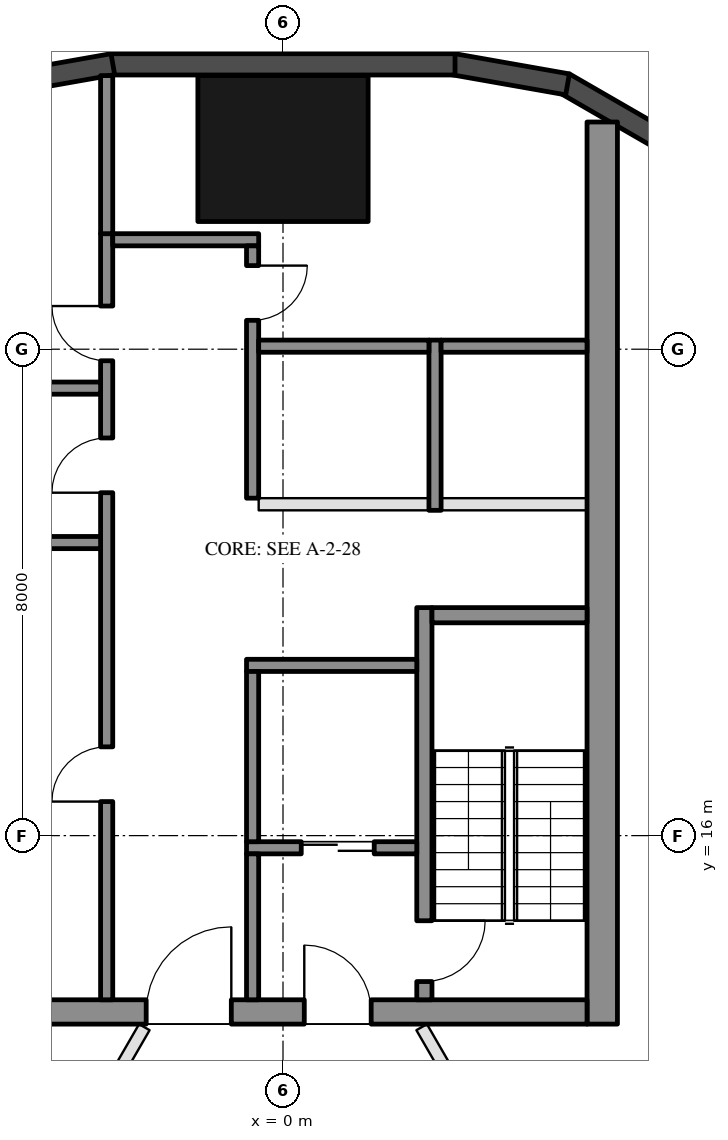
"""IFC4 building model, lengths in metres.
Left out: names, types, materials, properties, quantities, classifications, styles, units other than length and angle.
Written with IfcOpenShell. Run it as: python <this file> out.ifc"""

import sys

from ifc_helpers import new_model, si_unit, direction, frame, frame_2d, origin, origin_2d, place, context, subcontext, project, spatial, rectangle, hollow_rectangle, extrude, element, fill, save


model = new_model("IFC4")
c1 = context("Model", 3, precision=1e-05, world=origin(), true_north=direction((0.0, 1.0)))
c2 = subcontext(c1, "Body", "Model", "MODEL_VIEW")
j1 = project(units=[si_unit("LENGTHUNIT", "METRE"), si_unit("PLANEANGLEUNIT", "RADIAN")], contexts=[c1])
p1 = place(None, origin())
s1 = spatial("IfcSite", under=j1, at=p1, CompositionType="ELEMENT")
p2 = place(p1, origin())
s2 = spatial("IfcBuilding", under=s1, at=p2, CompositionType="ELEMENT")
p3 = place(p2, frame((0.0, 0.0, 124.2)))
s3 = spatial("IfcBuildingStorey", under=s2, at=p3, CompositionType="ELEMENT", Elevation=124.2)
p4 = place(p3, frame((0.0, 27.3, 0.0), z_axis=(0.0, 0.0, 1.0), x_axis=(1.0, 0.0, 0.0)))
e1 = element("IfcColumn", 1, at=p4, inside=s3, PredefinedType="COLUMN", context=c2, shape_type="SweptSolid", body=[
    extrude(hollow_rectangle(XDim=2.8, YDim=2.4, WallThickness=0.07, at=origin_2d()), origin(), (0.0, 0.0, 1.0), 3.7),
])
for number, where, z_axis, x_axis in (
    (2, (6.277, 27.422, 0.0), (0.0, 0.0, 1.0), (-0.866, 0.5, 0.0)),
    (3, (4.68, 28.356, 0.0), (0.0, 0.0, 1.0), (-0.985, 0.174, 0.0)),
):
    element("IfcWall", number, at=place(p3, frame(where, z_axis=z_axis, x_axis=x_axis)), inside=s3, PredefinedType="SOLIDWALL", context=c2, shape_type="SweptSolid", body=[
        extrude(rectangle(XDim=1.91, YDim=0.35, at=frame_2d((0.955, 0.0))), origin(), (0.0, 0.0, 1.0), 3.55),
    ])
p5 = place(p3, frame((2.829, 28.685, 0.0), z_axis=(0.0, 0.0, 1.0), x_axis=(-1.0, 0.0, 0.0)))
e4 = element("IfcWall", 4, at=p5, inside=s3, PredefinedType="SOLIDWALL", context=c2, shape_type="SweptSolid", body=[
    extrude(rectangle(XDim=5.658, YDim=0.35, at=frame_2d((2.829, 0.0))), origin(), (0.0, 0.0, 1.0), 3.55),
])
p6 = place(p3, frame((-2.799, 28.688, 0.0), z_axis=(0.0, 0.0, 1.0), x_axis=(-0.984798995425, -0.173697837091, 0.0)))
e5 = element("IfcWall", 5, at=p6, inside=s3, PredefinedType="SOLIDWALL", context=c2, shape_type="SweptSolid", body=[
    extrude(rectangle(XDim=1.91, YDim=0.35, at=frame_2d((0.955, 0.0))), origin(), (0.0, 0.0, 1.0), 3.55),
])
p7 = place(p3, frame((5.25, 12.9, 0.0), z_axis=(0.0, 0.0, 1.0), x_axis=(0.0, 1.0, 0.0)))
e6 = element("IfcWall", 6, at=p7, inside=s3, PredefinedType="SHEAR", context=c2, shape_type="SweptSolid", body=[
    extrude(rectangle(XDim=14.837, YDim=0.5, at=frame_2d((7.418, 0.0))), origin(), (0.0, 0.0, 1.0), 3.5),
])
p8 = place(p3, frame((5.0, 13.1, 0.0), z_axis=(0.0, 0.0, 1.0), x_axis=(-1.0, 0.0, 0.0)))
e7 = element("IfcWall", 7, at=p8, inside=s3, PredefinedType="SHEAR", context=c2, shape_type="SweptSolid", body=[
    extrude(rectangle(XDim=10.0, YDim=0.4, at=frame_2d((5.0, 0.0))), origin(), (0.0, 0.0, 1.0), 3.5),
])
p9 = place(p8, frame((3.55, 0.0, 0.0)))
e8 = element("IfcOpeningElement", 8, at=p9, cuts=e7, PredefinedType="OPENING", context=c2, shape_type="SweptSolid", body=[
    extrude(rectangle(XDim=1.1, YDim=2.1, at=frame_2d((0.55, 1.05))), frame((0.0, 0.21, 0.0), z_axis=(0.0, -1.0, 0.0), x_axis=(1.0, 0.0, 0.0)), (0.0, 0.0, 1.0), 0.42),
])
p10 = place(p8, frame((5.85, 0.0, 0.0)))
e9 = element("IfcOpeningElement", 9, at=p10, cuts=e7, PredefinedType="OPENING", context=c2, shape_type="SweptSolid", body=[
    extrude(rectangle(XDim=1.4, YDim=2.1, at=frame_2d((0.7, 1.05))), frame((0.0, 0.21, 0.0), z_axis=(0.0, -1.0, 0.0), x_axis=(1.0, 0.0, 0.0)), (0.0, 0.0, 1.0), 0.42),
])
p11 = place(p3, frame((2.325, 13.3, 0.0), z_axis=(0.0, 0.0, 1.0), x_axis=(0.0, 1.0, 0.0)))
e10 = element("IfcWall", 10, at=p11, inside=s3, PredefinedType="SHEAR", context=c2, shape_type="SweptSolid", body=[
    extrude(rectangle(XDim=6.45, YDim=0.25, at=frame_2d((3.225, 0.0))), origin(), (0.0, 0.0, 1.0), 3.5),
])
p12 = place(p11, frame((0.3, 0.0, 0.0)))
e11 = element("IfcOpeningElement", 11, at=p12, cuts=e10, PredefinedType="OPENING", context=c2, shape_type="SweptSolid", body=[
    extrude(rectangle(XDim=1.0, YDim=2.1, at=frame_2d((0.5, 1.05))), frame((0.0, 0.135, 0.0), z_axis=(0.0, -1.0, 0.0), x_axis=(1.0, 0.0, 0.0)), (0.0, 0.0, 1.0), 0.27),
])
p13 = place(p3, frame((5.0, 19.625, 0.0), z_axis=(0.0, 0.0, 1.0), x_axis=(-1.0, 0.0, 0.0)))
e12 = element("IfcWall", 12, at=p13, inside=s3, PredefinedType="SHEAR", context=c2, shape_type="SweptSolid", body=[
    extrude(rectangle(XDim=2.55, YDim=0.25, at=frame_2d((1.275, 0.0))), origin(), (0.0, 0.0, 1.0), 3.5),
])
p14 = place(p3, frame((2.2, 18.8, 0.0), z_axis=(0.0, 0.0, 1.0), x_axis=(-1.0, 0.0, 0.0)))
e13 = element("IfcWall", 13, at=p14, inside=s3, PredefinedType="SHEAR", context=c2, shape_type="SweptSolid", body=[
    extrude(rectangle(XDim=2.8, YDim=0.2, at=frame_2d((1.4, 0.0))), origin(), (0.0, 0.0, 1.0), 3.5),
])
p15 = place(p3, frame((2.2, 15.8, 0.0), z_axis=(0.0, 0.0, 1.0), x_axis=(-1.0, 0.0, 0.0)))
e14 = element("IfcWall", 14, at=p15, inside=s3, PredefinedType="SHEAR", context=c2, shape_type="SweptSolid", body=[
    extrude(rectangle(XDim=2.8, YDim=0.2, at=frame_2d((1.4, 0.0))), origin(), (0.0, 0.0, 1.0), 3.5),
])
p16 = place(p15, frame((0.7, 0.0, 0.0)))
e15 = element("IfcOpeningElement", 15, at=p16, cuts=e14, PredefinedType="OPENING", context=c2, shape_type="SweptSolid", body=[
    extrude(rectangle(XDim=1.2, YDim=2.1, at=frame_2d((0.6, 1.05))), frame((0.0, 0.11, 0.0), z_axis=(0.0, -1.0, 0.0), x_axis=(1.0, 0.0, 0.0)), (0.0, 0.0, 1.0), 0.22),
])
p17 = place(p3, frame((-0.5, 15.9, 0.0), z_axis=(0.0, 0.0, 1.0), x_axis=(0.0, 1.0, 0.0)))
e16 = element("IfcWall", 16, at=p17, inside=s3, PredefinedType="SHEAR", context=c2, shape_type="SweptSolid", body=[
    extrude(rectangle(XDim=2.8, YDim=0.2, at=frame_2d((1.4, 0.0))), origin(), (0.0, 0.0, 1.0), 3.5),
])
p18 = place(p3, frame((-0.5, 13.3, 0.0), z_axis=(0.0, 0.0, 1.0), x_axis=(0.0, 1.0, 0.0)))
e17 = element("IfcWall", 17, at=p18, inside=s3, PredefinedType="SHEAR", context=c2, shape_type="SweptSolid", body=[
    extrude(rectangle(XDim=2.4, YDim=0.2, at=frame_2d((1.2, 0.0))), origin(), (0.0, 0.0, 1.0), 3.5),
])
p19 = place(p3, frame((-2.9, 13.3, 0.0), z_axis=(0.0, 0.0, 1.0), x_axis=(0.0, 1.0, 0.0)))
e18 = element("IfcWall", 18, at=p19, inside=s3, PredefinedType="SHEAR", context=c2, shape_type="SweptSolid", body=[
    extrude(rectangle(XDim=12.6, YDim=0.2, at=frame_2d((6.3, 0.0))), origin(), (0.0, 0.0, 1.0), 3.5),
])
p20 = place(p19, frame((3.26, 0.0, 0.0)))
e19 = element("IfcOpeningElement", 19, at=p20, cuts=e18, PredefinedType="OPENING", context=c2, shape_type="SweptSolid", body=[
    extrude(rectangle(XDim=0.9, YDim=2.1, at=frame_2d((0.45, 1.05))), frame((0.0, 0.11, 0.0), z_axis=(0.0, -1.0, 0.0), x_axis=(1.0, 0.0, 0.0)), (0.0, 0.0, 1.0), 0.22),
])
p21 = place(p19, frame((8.34, 0.0, 0.0)))
e20 = element("IfcOpeningElement", 20, at=p21, cuts=e18, PredefinedType="OPENING", context=c2, shape_type="SweptSolid", body=[
    extrude(rectangle(XDim=0.9, YDim=2.1, at=frame_2d((0.45, 1.05))), frame((0.0, 0.11, 0.0), z_axis=(0.0, -1.0, 0.0), x_axis=(1.0, 0.0, 0.0)), (0.0, 0.0, 1.0), 0.22),
])
p22 = place(p19, frame((10.51, 0.0, 0.0)))
e21 = element("IfcOpeningElement", 21, at=p22, cuts=e18, PredefinedType="OPENING", context=c2, shape_type="SweptSolid", body=[
    extrude(rectangle(XDim=0.9, YDim=2.1, at=frame_2d((0.45, 1.05))), frame((0.0, 0.11, 0.0), z_axis=(0.0, -1.0, 0.0), x_axis=(1.0, 0.0, 0.0)), (0.0, 0.0, 1.0), 0.22),
])
p23 = place(p3, frame((-0.4, 25.8, 0.0), z_axis=(0.0, 0.0, 1.0), x_axis=(-1.0, 0.0, 0.0)))
e22 = element("IfcWall", 22, at=p23, inside=s3, PredefinedType="SHEAR", context=c2, shape_type="SweptSolid", body=[
    extrude(rectangle(XDim=2.4, YDim=0.2, at=frame_2d((1.2, 0.0))), origin(), (0.0, 0.0, 1.0), 3.5),
])
p24 = place(p3, frame((-0.5, 21.55, 0.0), z_axis=(0.0, 0.0, 1.0), x_axis=(0.0, 1.0, 0.0)))
e23 = element("IfcWall", 23, at=p24, inside=s3, PredefinedType="SHEAR", context=c2, shape_type="SweptSolid", body=[
    extrude(rectangle(XDim=4.15, YDim=0.2, at=frame_2d((2.075, 0.0))), origin(), (0.0, 0.0, 1.0), 3.5),
])
p25 = place(p24, frame((2.925, 0.0, 0.0)))
e24 = element("IfcOpeningElement", 24, at=p25, cuts=e23, PredefinedType="OPENING", context=c2, shape_type="SweptSolid", body=[
    extrude(rectangle(XDim=0.9, YDim=2.1, at=frame_2d((0.45, 1.05))), frame((0.0, 0.11, 0.0), z_axis=(0.0, -1.0, 0.0), x_axis=(1.0, 0.0, 0.0)), (0.0, 0.0, 1.0), 0.22),
])
for number, where, z_axis, x_axis in (
    (25, (-3.0, 20.82, 0.0), (0.0, 0.0, 1.0), (-1.0, 0.0, 0.0)),
    (26, (-3.0, 23.36, 0.0), (0.0, 0.0, 1.0), (-1.0, 0.0, 0.0)),
):
    element("IfcWall", number, at=place(p3, frame(where, z_axis=z_axis, x_axis=x_axis)), inside=s3, PredefinedType="SHEAR", context=c2, shape_type="SweptSolid", body=[
        extrude(rectangle(XDim=2.0, YDim=0.2, at=frame_2d((1.0, 0.0))), origin(), (0.0, 0.0, 1.0), 3.5),
    ])
p26 = place(p3, frame((-2.9, 25.9, 0.0), z_axis=(0.0, 0.0, 1.0), x_axis=(0.0, 1.0, 0.0)))
e27 = element("IfcWall", 27, at=p26, inside=s3, PredefinedType="SHEAR", context=c2, shape_type="SweptSolid", body=[
    extrude(rectangle(XDim=2.6, YDim=0.2, at=frame_2d((1.3, 0.0))), origin(), (0.0, 0.0, 1.0), 3.5),
])
p27 = place(p3, frame((2.5, 21.35, 0.0), z_axis=(0.0, 0.0, 1.0), x_axis=(0.0, 1.0, 0.0)))
e28 = element("IfcWall", 28, at=p27, inside=s3, PredefinedType="SHEAR", context=c2, shape_type="SweptSolid", body=[
    extrude(rectangle(XDim=2.8, YDim=0.2, at=frame_2d((1.4, 0.0))), origin(), (0.0, 0.0, 1.0), 3.5),
])
p28 = place(p3, frame((5.0, 24.05, 0.0), z_axis=(0.0, 0.0, 1.0), x_axis=(-1.0, 0.0, 0.0)))
e29 = element("IfcWall", 29, at=p28, inside=s3, PredefinedType="SHEAR", context=c2, shape_type="SweptSolid", body=[
    extrude(rectangle(XDim=2.4, YDim=0.2, at=frame_2d((1.2, 0.0))), origin(), (0.0, 0.0, 1.0), 3.5),
])
p29 = place(p3, frame((2.4, 24.05, 0.0), z_axis=(0.0, 0.0, 1.0), x_axis=(-1.0, 0.0, 0.0)))
e30 = element("IfcWall", 30, at=p29, inside=s3, PredefinedType="SHEAR", context=c2, shape_type="SweptSolid", body=[
    extrude(rectangle(XDim=2.8, YDim=0.2, at=frame_2d((1.4, 0.0))), origin(), (0.0, 0.0, 1.0), 3.5),
])
p30 = place(p3, frame((5.0, 21.45, 0.0), z_axis=(0.0, 0.0, 1.0), x_axis=(-1.0, 0.0, 0.0)))
e31 = element("IfcWall", 31, at=p30, inside=s3, PredefinedType="PARTITIONING", context=c2, shape_type="SweptSolid", body=[
    extrude(rectangle(XDim=2.4, YDim=0.2, at=frame_2d((1.2, 0.0))), origin(), (0.0, 0.0, 1.0), 3.5),
])
p31 = place(p3, frame((2.4, 21.45, 0.0), z_axis=(0.0, 0.0, 1.0), x_axis=(-1.0, 0.0, 0.0)))
e32 = element("IfcWall", 32, at=p31, inside=s3, PredefinedType="PARTITIONING", context=c2, shape_type="SweptSolid", body=[
    extrude(rectangle(XDim=2.8, YDim=0.2, at=frame_2d((1.4, 0.0))), origin(), (0.0, 0.0, 1.0), 3.5),
])
p32 = place(p3, frame((2.281, 12.85, 0.0), z_axis=(0.0, 0.0, 1.0), x_axis=(0.499992362392, -0.866029813314, 0.0)))
e33 = element("IfcWall", 33, at=p32, inside=s3, PredefinedType="PARTITIONING", context=c2, shape_type="SweptSolid", body=[
    extrude(rectangle(XDim=7.986, YDim=0.2, at=frame_2d((3.993, 0.0))), origin(), (0.0, 0.0, 1.0), 2.95),
])
p33 = place(p32, frame((3.493, 0.0, 0.0)))
e34 = element("IfcOpeningElement", 34, at=p33, cuts=e33, PredefinedType="OPENING", context=c2, shape_type="SweptSolid", body=[
    extrude(rectangle(XDim=1.0, YDim=2.1, at=frame_2d((0.5, 1.05))), frame((0.0, 0.11, 0.0), z_axis=(0.0, -1.0, 0.0), x_axis=(1.0, 0.0, 0.0)), (0.0, 0.0, 1.0), 0.22),
])
p34 = place(p3, frame((-5.323, 7.581, 0.0), z_axis=(0.0, 0.0, 1.0), x_axis=(0.49998410452, 0.866034580849, 0.0)))
e35 = element("IfcWall", 35, at=p34, inside=s3, PredefinedType="PARTITIONING", context=c2, shape_type="SweptSolid", body=[
    extrude(rectangle(XDim=6.085, YDim=0.2, at=frame_2d((3.042, 0.0))), origin(), (0.0, 0.0, 1.0), 2.95),
])
p35 = place(p34, frame((2.542, 0.0, 0.0)))
e36 = element("IfcOpeningElement", 36, at=p35, cuts=e35, PredefinedType="OPENING", context=c2, shape_type="SweptSolid", body=[
    extrude(rectangle(XDim=1.0, YDim=2.1, at=frame_2d((0.5, 1.05))), frame((0.0, 0.11, 0.0), z_axis=(0.0, -1.0, 0.0), x_axis=(1.0, 0.0, 0.0)), (0.0, 0.0, 1.0), 0.22),
])
p36 = place(p16, origin())
e37 = element("IfcDoor", 37, at=p36, inside=s3, OperationType="DOUBLE_DOOR_SLIDING", PredefinedType="DOOR", context=c2, shape_type="SweptSolid", body=[
    extrude(rectangle(XDim=1.2, YDim=2.1, at=frame_2d((0.6, 1.05))), frame((0.0, 0.025, 0.0), z_axis=(0.0, -1.0, 0.0), x_axis=(1.0, 0.0, 0.0)), (0.0, 0.0, 1.0), 0.05),
])
fill(e15, e37)
p37 = place(p20, origin())
e38 = element("IfcDoor", 38, at=p37, inside=s3, OperationType="SINGLE_SWING_LEFT", PredefinedType="DOOR", context=c2, shape_type="SweptSolid", body=[
    extrude(rectangle(XDim=0.9, YDim=2.1, at=frame_2d((0.45, 1.05))), frame((0.0, 0.025, 0.0), z_axis=(0.0, -1.0, 0.0), x_axis=(1.0, 0.0, 0.0)), (0.0, 0.0, 1.0), 0.05),
])
fill(e19, e38)
p38 = place(p21, origin())
e39 = element("IfcDoor", 39, at=p38, inside=s3, OperationType="SINGLE_SWING_LEFT", PredefinedType="DOOR", context=c2, shape_type="SweptSolid", body=[
    extrude(rectangle(XDim=0.9, YDim=2.1, at=frame_2d((0.45, 1.05))), frame((0.0, 0.025, 0.0), z_axis=(0.0, -1.0, 0.0), x_axis=(1.0, 0.0, 0.0)), (0.0, 0.0, 1.0), 0.05),
])
fill(e20, e39)
p39 = place(p22, origin())
e40 = element("IfcDoor", 40, at=p39, inside=s3, OperationType="SINGLE_SWING_RIGHT", PredefinedType="DOOR", context=c2, shape_type="SweptSolid", body=[
    extrude(rectangle(XDim=0.9, YDim=2.1, at=frame_2d((0.45, 1.05))), frame((0.0, 0.025, 0.0), z_axis=(0.0, -1.0, 0.0), x_axis=(1.0, 0.0, 0.0)), (0.0, 0.0, 1.0), 0.05),
])
fill(e21, e40)
p40 = place(p25, frame((0.9, 0.0, 0.0), z_axis=(0.0, 0.0, 1.0), x_axis=(-1.0, 0.0, 0.0)))
e41 = element("IfcDoor", 41, at=p40, inside=s3, OperationType="SINGLE_SWING_LEFT", PredefinedType="DOOR", context=c2, shape_type="SweptSolid", body=[
    extrude(rectangle(XDim=0.9, YDim=2.1, at=frame_2d((0.45, 1.05))), frame((0.0, 0.025, 0.0), z_axis=(0.0, -1.0, 0.0), x_axis=(1.0, 0.0, 0.0)), (0.0, 0.0, 1.0), 0.05),
])
fill(e24, e41)
p41 = place(p9, frame((1.1, 0.0, 0.0), z_axis=(0.0, 0.0, 1.0), x_axis=(-1.0, 0.0, 0.0)))
e42 = element("IfcDoor", 42, at=p41, inside=s3, OperationType="SINGLE_SWING_LEFT", PredefinedType="DOOR", context=c2, shape_type="SweptSolid", body=[
    extrude(rectangle(XDim=1.1, YDim=2.1, at=frame_2d((0.55, 1.05))), frame((0.0, 0.025, 0.0), z_axis=(0.0, -1.0, 0.0), x_axis=(1.0, 0.0, 0.0)), (0.0, 0.0, 1.0), 0.05),
])
fill(e8, e42)
p42 = place(p10, frame((1.4, 0.0, 0.0), z_axis=(0.0, 0.0, 1.0), x_axis=(-1.0, 0.0, 0.0)))
e43 = element("IfcDoor", 43, at=p42, inside=s3, OperationType="DOUBLE_DOOR_SINGLE_SWING", PredefinedType="DOOR", context=c2, shape_type="SweptSolid", body=[
    extrude(rectangle(XDim=1.4, YDim=2.1, at=frame_2d((0.7, 1.05))), frame((0.0, 0.025, 0.0), z_axis=(0.0, -1.0, 0.0), x_axis=(1.0, 0.0, 0.0)), (0.0, 0.0, 1.0), 0.05),
])
fill(e9, e43)
p43 = place(p12, frame((1.0, 0.0, 0.0), z_axis=(0.0, 0.0, 1.0), x_axis=(-1.0, 0.0, 0.0)))
e44 = element("IfcDoor", 44, at=p43, inside=s3, OperationType="SINGLE_SWING_LEFT", PredefinedType="DOOR", context=c2, shape_type="SweptSolid", body=[
    extrude(rectangle(XDim=1.0, YDim=2.1, at=frame_2d((0.5, 1.05))), frame((0.0, 0.025, 0.0), z_axis=(0.0, -1.0, 0.0), x_axis=(1.0, 0.0, 0.0)), (0.0, 0.0, 1.0), 0.05),
])
fill(e11, e44)
save(model, sys.argv[1])
